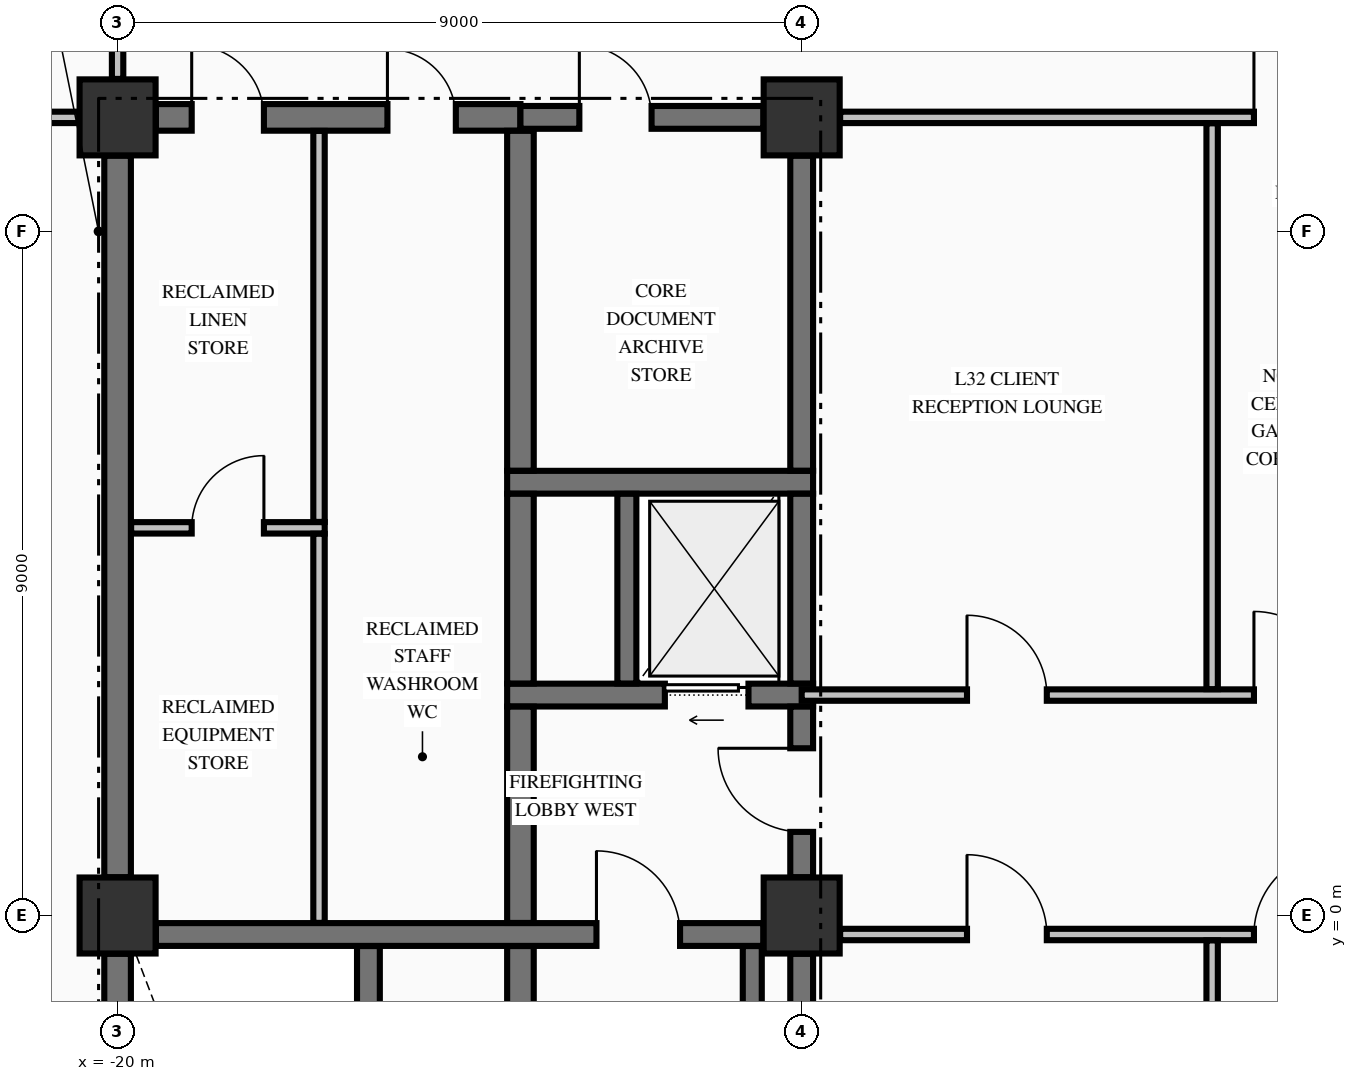
"""IFC4 building model, lengths in metres.
Left out: names, types, materials, properties, quantities, classifications, styles, units other than length and angle.
Written with IfcOpenShell. Run it as: python <this file> out.ifc"""

import sys

from ifc_helpers import new_model, si_unit, direction, frame, frame_2d, origin, origin_2d, place, context, subcontext, project, spatial, rectangle, extrude, element, fill, save


model = new_model("IFC4")
c1 = context("Model", 3, precision=1e-05, world=origin(), true_north=direction((0.0, 1.0)))
c2 = subcontext(c1, "Body", "Model", "MODEL_VIEW")
j1 = project(units=[si_unit("LENGTHUNIT", "METRE"), si_unit("PLANEANGLEUNIT", "RADIAN")], contexts=[c1])
p1 = place(None, origin())
s1 = spatial("IfcSite", under=j1, at=p1, CompositionType="ELEMENT")
p2 = place(p1, origin())
s2 = spatial("IfcBuilding", under=s1, at=p2, CompositionType="ELEMENT")
p3 = place(p2, frame((0.0, 0.0, 128.49)))
s3 = spatial("IfcBuildingStorey", under=s2, at=p3, CompositionType="ELEMENT", Elevation=128.49)
for number, where, z_axis, x_axis in (
    (1, (-20.0, 10.5, -0.25), (0.0, 0.0, 1.0), (1.0, 0.0, 0.0)),
    (2, (-11.0, 0.0, -0.25), (0.0, 0.0, 1.0), (1.0, 0.0, 0.0)),
    (3, (-11.0, 10.5, -0.25), (0.0, 0.0, 1.0), (1.0, 0.0, 0.0)),
    (4, (-20.0, 0.0, -0.25), (0.0, 0.0, 1.0), (1.0, 0.0, 0.0)),
):
    element("IfcColumn", number, at=place(p3, frame(where, z_axis=z_axis, x_axis=x_axis)), inside=s3, PredefinedType="COLUMN", context=c2, shape_type="SweptSolid", body=[
        extrude(rectangle(XDim=1.0, YDim=1.0, at=origin_2d()), origin(), (0.0, 0.0, 1.0), 3.57),
    ])
p4 = place(p3, frame((-19.496, -0.25, 0.0), z_axis=(0.0, 0.0, 1.0), x_axis=(1.0, 0.0, 0.0)))
e5 = element("IfcWall", 5, at=p4, inside=s3, PredefinedType="SHEAR", context=c2, shape_type="SweptSolid", body=[
    extrude(rectangle(XDim=7.992, YDim=0.3, at=frame_2d((3.996, 0.0))), origin(), (0.0, 0.0, 1.0), 3.32),
])
p5 = place(p4, frame((5.796, 0.0, 0.0)))
e6 = element("IfcOpeningElement", 6, at=p5, cuts=e5, PredefinedType="OPENING", context=c2, shape_type="SweptSolid", body=[
    extrude(rectangle(XDim=1.1, YDim=2.15, at=frame_2d((0.55, 1.075))), frame((0.0, 0.16, 0.0), z_axis=(0.0, -1.0, 0.0), x_axis=(1.0, 0.0, 0.0)), (0.0, 0.0, 1.0), 0.32),
])
p6 = place(p3, frame((-14.875, 2.9, 0.0), z_axis=(0.0, 0.0, 1.0), x_axis=(1.0, 0.0, 0.0)))
e7 = element("IfcWall", 7, at=p6, inside=s3, PredefinedType="SHEAR", context=c2, shape_type="SweptSolid", body=[
    extrude(rectangle(XDim=4.025, YDim=0.3, at=frame_2d((2.012, 0.0))), origin(), (0.0, 0.0, 1.0), 3.32),
])
p7 = place(p6, frame((2.075, 0.0, 0.0)))
e8 = element("IfcOpeningElement", 8, at=p7, cuts=e7, PredefinedType="OPENING", context=c2, shape_type="SweptSolid", body=[
    extrude(rectangle(XDim=1.1, YDim=2.2, at=frame_2d((0.55, 1.1))), frame((0.0, 0.16, 0.0), z_axis=(0.0, -1.0, 0.0), x_axis=(1.0, 0.0, 0.0)), (0.0, 0.0, 1.0), 0.32),
])
p8 = place(p3, frame((-14.875, 5.7, 0.0), z_axis=(0.0, 0.0, 1.0), x_axis=(1.0, 0.0, 0.0)))
e9 = element("IfcWall", 9, at=p8, inside=s3, PredefinedType="SHEAR", context=c2, shape_type="SweptSolid", body=[
    extrude(rectangle(XDim=4.025, YDim=0.3, at=frame_2d((2.012, 0.0))), origin(), (0.0, 0.0, 1.0), 3.32),
])
p9 = place(p3, frame((-19.496, 10.5, 0.0), z_axis=(0.0, 0.0, 1.0), x_axis=(1.0, 0.0, 0.0)))
e10 = element("IfcWall", 10, at=p9, inside=s3, PredefinedType="SHEAR", context=c2, shape_type="SweptSolid", body=[
    extrude(rectangle(XDim=4.796, YDim=0.35, at=frame_2d((2.398, 0.0))), origin(), (0.0, 0.0, 1.0), 3.32),
])
p10 = place(p9, frame((0.471, 0.0, 0.0)))
e11 = element("IfcOpeningElement", 11, at=p10, cuts=e10, PredefinedType="OPENING", context=c2, shape_type="SweptSolid", body=[
    extrude(rectangle(XDim=0.95, YDim=2.15, at=frame_2d((0.475, 1.075))), frame((0.0, 0.185, 0.0), z_axis=(0.0, -1.0, 0.0), x_axis=(1.0, 0.0, 0.0)), (0.0, 0.0, 1.0), 0.37),
])
p11 = place(p9, frame((3.046, 0.0, 0.0)))
e12 = element("IfcOpeningElement", 12, at=p11, cuts=e10, PredefinedType="OPENING", context=c2, shape_type="SweptSolid", body=[
    extrude(rectangle(XDim=0.9, YDim=2.15, at=frame_2d((0.45, 1.075))), frame((0.0, 0.185, 0.0), z_axis=(0.0, -1.0, 0.0), x_axis=(1.0, 0.0, 0.0)), (0.0, 0.0, 1.0), 0.37),
])
p12 = place(p3, frame((-14.7, 10.5, 0.0), z_axis=(0.0, 0.0, 1.0), x_axis=(1.0, 0.0, 0.0)))
e13 = element("IfcWall", 13, at=p12, inside=s3, PredefinedType="SHEAR", context=c2, shape_type="SweptSolid", body=[
    extrude(rectangle(XDim=3.196, YDim=0.3, at=frame_2d((1.598, 0.0))), origin(), (0.0, 0.0, 1.0), 3.32),
])
p13 = place(p12, frame((0.775, 0.0, 0.0)))
e14 = element("IfcOpeningElement", 14, at=p13, cuts=e13, PredefinedType="OPENING", context=c2, shape_type="SweptSolid", body=[
    extrude(rectangle(XDim=0.95, YDim=2.15, at=frame_2d((0.475, 1.075))), frame((0.0, 0.16, 0.0), z_axis=(0.0, -1.0, 0.0), x_axis=(1.0, 0.0, 0.0)), (0.0, 0.0, 1.0), 0.32),
])
p14 = place(p3, frame((-10.494, -0.25, 0.0), z_axis=(0.0, 0.0, 1.0), x_axis=(1.0, 0.0, 0.0)))
e15 = element("IfcWall", 15, at=p14, inside=s3, PredefinedType="PARTITIONING", context=c2, shape_type="SweptSolid", body=[
    extrude(rectangle(XDim=20.988, YDim=0.15, at=frame_2d((10.494, 0.0))), origin(), (0.0, 0.0, 1.0), 3.32),
])
p15 = place(p14, frame((5.444, 0.0, 0.0)))
e16 = element("IfcOpeningElement", 16, at=p15, cuts=e15, PredefinedType="OPENING", context=c2, shape_type="SweptSolid", body=[
    extrude(rectangle(XDim=1.1, YDim=2.15, at=frame_2d((0.55, 1.075))), frame((0.0, 0.085, 0.0), z_axis=(0.0, -1.0, 0.0), x_axis=(1.0, 0.0, 0.0)), (0.0, 0.0, 1.0), 0.17),
])
p16 = place(p14, frame((1.669, 0.0, 0.0)))
e17 = element("IfcOpeningElement", 17, at=p16, cuts=e15, PredefinedType="OPENING", context=c2, shape_type="SweptSolid", body=[
    extrude(rectangle(XDim=1.05, YDim=2.15, at=frame_2d((0.525, 1.075))), frame((0.0, 0.085, 0.0), z_axis=(0.0, -1.0, 0.0), x_axis=(1.0, 0.0, 0.0)), (0.0, 0.0, 1.0), 0.17),
])
p17 = place(p14, frame((13.819, 0.0, 0.0)))
e18 = element("IfcOpeningElement", 18, at=p17, cuts=e15, PredefinedType="OPENING", context=c2, shape_type="SweptSolid", body=[
    extrude(rectangle(XDim=0.95, YDim=2.15, at=frame_2d((0.475, 1.075))), frame((0.0, 0.085, 0.0), z_axis=(0.0, -1.0, 0.0), x_axis=(1.0, 0.0, 0.0)), (0.0, 0.0, 1.0), 0.17),
])
p18 = place(p3, frame((-11.0, 2.9, 0.0), z_axis=(0.0, 0.0, 1.0), x_axis=(1.0, 0.0, 0.0)))
e19 = element("IfcWall", 19, at=p18, inside=s3, PredefinedType="PARTITIONING", context=c2, shape_type="SweptSolid", body=[
    extrude(rectangle(XDim=22.0, YDim=0.15, at=frame_2d((11.0, 0.0))), origin(), (0.0, 0.0, 1.0), 3.32),
])
p19 = place(p18, frame((5.95, 0.0, 0.0)))
e20 = element("IfcOpeningElement", 20, at=p19, cuts=e19, PredefinedType="OPENING", context=c2, shape_type="SweptSolid", body=[
    extrude(rectangle(XDim=1.1, YDim=2.15, at=frame_2d((0.55, 1.075))), frame((0.0, 0.085, 0.0), z_axis=(0.0, -1.0, 0.0), x_axis=(1.0, 0.0, 0.0)), (0.0, 0.0, 1.0), 0.17),
])
p20 = place(p18, frame((2.175, 0.0, 0.0)))
e21 = element("IfcOpeningElement", 21, at=p20, cuts=e19, PredefinedType="OPENING", context=c2, shape_type="SweptSolid", body=[
    extrude(rectangle(XDim=1.05, YDim=2.15, at=frame_2d((0.525, 1.075))), frame((0.0, 0.085, 0.0), z_axis=(0.0, -1.0, 0.0), x_axis=(1.0, 0.0, 0.0)), (0.0, 0.0, 1.0), 0.17),
])
p21 = place(p18, frame((14.25, 0.0, 0.0)))
e22 = element("IfcOpeningElement", 22, at=p21, cuts=e19, PredefinedType="OPENING", context=c2, shape_type="SweptSolid", body=[
    extrude(rectangle(XDim=1.1, YDim=2.15, at=frame_2d((0.55, 1.075))), frame((0.0, 0.085, 0.0), z_axis=(0.0, -1.0, 0.0), x_axis=(1.0, 0.0, 0.0)), (0.0, 0.0, 1.0), 0.17),
])
p22 = place(p3, frame((-19.822, 5.1, 0.0), z_axis=(0.0, 0.0, 1.0), x_axis=(1.0, 0.0, 0.0)))
e23 = element("IfcWall", 23, at=p22, inside=s3, PredefinedType="PARTITIONING", context=c2, shape_type="SweptSolid", body=[
    extrude(rectangle(XDim=2.547, YDim=0.15, at=frame_2d((1.273, 0.0))), origin(), (0.0, 0.0, 1.0), 3.32),
])
p23 = place(p22, frame((0.797, 0.0, 0.0)))
e24 = element("IfcOpeningElement", 24, at=p23, cuts=e23, PredefinedType="OPENING", context=c2, shape_type="SweptSolid", body=[
    extrude(rectangle(XDim=0.95, YDim=2.15, at=frame_2d((0.475, 1.075))), frame((0.0, 0.085, 0.0), z_axis=(0.0, -1.0, 0.0), x_axis=(1.0, 0.0, 0.0)), (0.0, 0.0, 1.0), 0.17),
])
p24 = place(p3, frame((-27.835, 10.5, 0.0), z_axis=(0.0, 0.0, 1.0), x_axis=(1.0, 0.0, 0.0)))
e25 = element("IfcWall", 25, at=p24, inside=s3, PredefinedType="PARTITIONING", context=c2, shape_type="SweptSolid", body=[
    extrude(rectangle(XDim=7.329, YDim=0.15, at=frame_2d((3.665, 0.0))), origin(), (0.0, 0.0, 1.0), 3.32),
])
p25 = place(p24, frame((3.36, 0.0, 0.0)))
e26 = element("IfcOpeningElement", 26, at=p25, cuts=e25, PredefinedType="OPENING", context=c2, shape_type="SweptSolid", body=[
    extrude(rectangle(XDim=0.95, YDim=2.15, at=frame_2d((0.475, 1.075))), frame((0.0, 0.085, 0.0), z_axis=(0.0, -1.0, 0.0), x_axis=(1.0, 0.0, 0.0)), (0.0, 0.0, 1.0), 0.17),
])
p26 = place(p3, frame((-10.494, 10.5, 0.0), z_axis=(0.0, 0.0, 1.0), x_axis=(1.0, 0.0, 0.0)))
e27 = element("IfcWall", 27, at=p26, inside=s3, PredefinedType="PARTITIONING", context=c2, shape_type="SweptSolid", body=[
    extrude(rectangle(XDim=20.988, YDim=0.15, at=frame_2d((10.494, 0.0))), origin(), (0.0, 0.0, 1.0), 3.32),
])
p27 = place(p26, frame((5.444, 0.0, 0.0)))
e28 = element("IfcOpeningElement", 28, at=p27, cuts=e27, PredefinedType="OPENING", context=c2, shape_type="SweptSolid", body=[
    extrude(rectangle(XDim=1.1, YDim=2.15, at=frame_2d((0.55, 1.075))), frame((0.0, 0.085, 0.0), z_axis=(0.0, -1.0, 0.0), x_axis=(1.0, 0.0, 0.0)), (0.0, 0.0, 1.0), 0.17),
])
p28 = place(p3, frame((-20.0, -9.446, 0.0), z_axis=(0.0, 0.0, 1.0), x_axis=(0.0, 1.0, 0.0)))
e29 = element("IfcWall", 29, at=p28, inside=s3, PredefinedType="SHEAR", context=c2, shape_type="SweptSolid", body=[
    extrude(rectangle(XDim=8.942, YDim=0.35, at=frame_2d((4.471, 0.0))), origin(), (0.0, 0.0, 1.0), 3.32),
])
p29 = place(p3, frame((-20.0, 0.504, 0.0), z_axis=(0.0, 0.0, 1.0), x_axis=(0.0, 1.0, 0.0)))
e30 = element("IfcWall", 30, at=p29, inside=s3, PredefinedType="SHEAR", context=c2, shape_type="SweptSolid", body=[
    extrude(rectangle(XDim=9.492, YDim=0.35, at=frame_2d((4.746, 0.0))), origin(), (0.0, 0.0, 1.0), 3.32),
])
p30 = place(p3, frame((-16.7, -9.773, 0.0), z_axis=(0.0, 0.0, 1.0), x_axis=(0.0, 1.0, 0.0)))
e31 = element("IfcWall", 31, at=p30, inside=s3, PredefinedType="SHEAR", context=c2, shape_type="SweptSolid", body=[
    extrude(rectangle(XDim=9.371, YDim=0.3, at=frame_2d((4.686, 0.0))), origin(), (0.0, 0.0, 1.0), 3.32),
])
p31 = place(p3, frame((-14.7, -9.773, 0.0), z_axis=(0.0, 0.0, 1.0), x_axis=(0.0, 1.0, 0.0)))
e32 = element("IfcWall", 32, at=p31, inside=s3, PredefinedType="SHEAR", context=c2, shape_type="SweptSolid", body=[
    extrude(rectangle(XDim=9.371, YDim=0.35, at=frame_2d((4.686, 0.0))), origin(), (0.0, 0.0, 1.0), 3.32),
])
p32 = place(p3, frame((-14.7, -0.098, 0.0), z_axis=(0.0, 0.0, 1.0), x_axis=(0.0, 1.0, 0.0)))
e33 = element("IfcWall", 33, at=p32, inside=s3, PredefinedType="SHEAR", context=c2, shape_type="SweptSolid", body=[
    extrude(rectangle(XDim=2.846, YDim=0.35, at=frame_2d((1.423, 0.0))), origin(), (0.0, 0.0, 1.0), 3.32),
])
p33 = place(p3, frame((-14.7, 3.052, 0.0), z_axis=(0.0, 0.0, 1.0), x_axis=(0.0, 1.0, 0.0)))
e34 = element("IfcWall", 34, at=p33, inside=s3, PredefinedType="SHEAR", context=c2, shape_type="SweptSolid", body=[
    extrude(rectangle(XDim=2.496, YDim=0.35, at=frame_2d((1.248, 0.0))), origin(), (0.0, 0.0, 1.0), 3.32),
])
p34 = place(p3, frame((-14.7, 5.852, 0.0), z_axis=(0.0, 0.0, 1.0), x_axis=(0.0, 1.0, 0.0)))
e35 = element("IfcWall", 35, at=p34, inside=s3, PredefinedType="SHEAR", context=c2, shape_type="SweptSolid", body=[
    extrude(rectangle(XDim=4.471, YDim=0.35, at=frame_2d((2.235, 0.0))), origin(), (0.0, 0.0, 1.0), 3.32),
])
p35 = place(p3, frame((-13.3, 3.052, 0.0), z_axis=(0.0, 0.0, 1.0), x_axis=(0.0, 1.0, 0.0)))
e36 = element("IfcWall", 36, at=p35, inside=s3, PredefinedType="SOLIDWALL", context=c2, shape_type="SweptSolid", body=[
    extrude(rectangle(XDim=2.496, YDim=0.25, at=frame_2d((1.248, 0.0))), origin(), (0.0, 0.0, 1.0), 3.32),
])
p36 = place(p3, frame((-11.65, -9.798, 0.0), z_axis=(0.0, 0.0, 1.0), x_axis=(0.0, 1.0, 0.0)))
e37 = element("IfcWall", 37, at=p36, inside=s3, PredefinedType="SOLIDWALL", context=c2, shape_type="SweptSolid", body=[
    extrude(rectangle(XDim=9.396, YDim=0.25, at=frame_2d((4.698, 0.0))), origin(), (0.0, 0.0, 1.0), 3.32),
])
p37 = place(p3, frame((-11.0, -9.446, 0.0), z_axis=(0.0, 0.0, 1.0), x_axis=(0.0, 1.0, 0.0)))
e38 = element("IfcWall", 38, at=p37, inside=s3, PredefinedType="SHEAR", context=c2, shape_type="SweptSolid", body=[
    extrude(rectangle(XDim=8.942, YDim=0.3, at=frame_2d((4.471, 0.0))), origin(), (0.0, 0.0, 1.0), 3.32),
])
p38 = place(p3, frame((-11.0, 0.504, 0.0), z_axis=(0.0, 0.0, 1.0), x_axis=(0.0, 1.0, 0.0)))
e39 = element("IfcWall", 39, at=p38, inside=s3, PredefinedType="SHEAR", context=c2, shape_type="SweptSolid", body=[
    extrude(rectangle(XDim=2.244, YDim=0.3, at=frame_2d((1.122, 0.0))), origin(), (0.0, 0.0, 1.0), 3.32),
])
p39 = place(p38, frame((0.596, 0.0, 0.0)))
e40 = element("IfcOpeningElement", 40, at=p39, cuts=e39, PredefinedType="OPENING", context=c2, shape_type="SweptSolid", body=[
    extrude(rectangle(XDim=1.1, YDim=2.15, at=frame_2d((0.55, 1.075))), frame((0.0, 0.16, 0.0), z_axis=(0.0, -1.0, 0.0), x_axis=(1.0, 0.0, 0.0)), (0.0, 0.0, 1.0), 0.32),
])
p40 = place(p3, frame((-11.0, 3.052, 0.0), z_axis=(0.0, 0.0, 1.0), x_axis=(0.0, 1.0, 0.0)))
e41 = element("IfcWall", 41, at=p40, inside=s3, PredefinedType="SHEAR", context=c2, shape_type="SweptSolid", body=[
    extrude(rectangle(XDim=2.496, YDim=0.3, at=frame_2d((1.248, 0.0))), origin(), (0.0, 0.0, 1.0), 3.32),
])
p41 = place(p3, frame((-11.0, 5.852, 0.0), z_axis=(0.0, 0.0, 1.0), x_axis=(0.0, 1.0, 0.0)))
e42 = element("IfcWall", 42, at=p41, inside=s3, PredefinedType="SHEAR", context=c2, shape_type="SweptSolid", body=[
    extrude(rectangle(XDim=4.144, YDim=0.3, at=frame_2d((2.072, 0.0))), origin(), (0.0, 0.0, 1.0), 3.32),
])
p42 = place(p3, frame((-20.0, 11.006, 0.0), z_axis=(0.0, 0.0, 1.0), x_axis=(0.0, 1.0, 0.0)))
e43 = element("IfcWall", 43, at=p42, inside=s3, PredefinedType="PARTITIONING", context=c2, shape_type="SweptSolid", body=[
    extrude(rectangle(XDim=2.466, YDim=0.15, at=frame_2d((1.233, 0.0))), origin(), (0.0, 0.0, 1.0), 2.81),
])
p43 = place(p42, frame((0.549, 0.0, 0.0)))
e44 = element("IfcOpeningElement", 44, at=p43, cuts=e43, PredefinedType="OPENING", context=c2, shape_type="SweptSolid", body=[
    extrude(rectangle(XDim=0.95, YDim=2.15, at=frame_2d((0.475, 1.075))), frame((0.0, 0.085, 0.0), z_axis=(0.0, -1.0, 0.0), x_axis=(1.0, 0.0, 0.0)), (0.0, 0.0, 1.0), 0.17),
])
p44 = place(p3, frame((-17.35, -0.097, 0.0), z_axis=(0.0, 0.0, 1.0), x_axis=(0.0, 1.0, 0.0)))
e45 = element("IfcWall", 45, at=p44, inside=s3, PredefinedType="PARTITIONING", context=c2, shape_type="SweptSolid", body=[
    extrude(rectangle(XDim=5.119, YDim=0.15, at=frame_2d((2.56, 0.0))), origin(), (0.0, 0.0, 1.0), 3.32),
])
p45 = place(p3, frame((-17.35, 5.178, 0.0), z_axis=(0.0, 0.0, 1.0), x_axis=(0.0, 1.0, 0.0)))
e46 = element("IfcWall", 46, at=p45, inside=s3, PredefinedType="PARTITIONING", context=c2, shape_type="SweptSolid", body=[
    extrude(rectangle(XDim=5.144, YDim=0.15, at=frame_2d((2.572, 0.0))), origin(), (0.0, 0.0, 1.0), 3.32),
])
p46 = place(p3, frame((-5.6, -9.872, 0.0), z_axis=(0.0, 0.0, 1.0), x_axis=(0.0, 1.0, 0.0)))
e47 = element("IfcWall", 47, at=p46, inside=s3, PredefinedType="PARTITIONING", context=c2, shape_type="SweptSolid", body=[
    extrude(rectangle(XDim=9.544, YDim=0.15, at=frame_2d((4.772, 0.0))), origin(), (0.0, 0.0, 1.0), 3.32),
])
p47 = place(p3, frame((-5.6, 2.978, 0.0), z_axis=(0.0, 0.0, 1.0), x_axis=(0.0, 1.0, 0.0)))
e48 = element("IfcWall", 48, at=p47, inside=s3, PredefinedType="PARTITIONING", context=c2, shape_type="SweptSolid", body=[
    extrude(rectangle(XDim=7.444, YDim=0.15, at=frame_2d((3.722, 0.0))), origin(), (0.0, 0.0, 1.0), 3.32),
])
p48 = place(p5, origin())
e49 = element("IfcDoor", 49, at=p48, inside=s3, OperationType="SINGLE_SWING_LEFT", PredefinedType="DOOR", context=c2, shape_type="SweptSolid", body=[
    extrude(rectangle(XDim=1.1, YDim=2.15, at=frame_2d((0.55, 1.075))), frame((0.0, 0.025, 0.0), z_axis=(0.0, -1.0, 0.0), x_axis=(1.0, 0.0, 0.0)), (0.0, 0.0, 1.0), 0.05),
])
fill(e6, e49)
p49 = place(p39, origin())
e50 = element("IfcDoor", 50, at=p49, inside=s3, OperationType="SINGLE_SWING_RIGHT", PredefinedType="DOOR", context=c2, shape_type="SweptSolid", body=[
    extrude(rectangle(XDim=1.1, YDim=2.15, at=frame_2d((0.55, 1.075))), frame((0.0, 0.025, 0.0), z_axis=(0.0, -1.0, 0.0), x_axis=(1.0, 0.0, 0.0)), (0.0, 0.0, 1.0), 0.05),
])
fill(e40, e50)
p50 = place(p7, origin())
e51 = element("IfcDoor", 51, at=p50, inside=s3, OperationType="SLIDING_TO_LEFT", PredefinedType="DOOR", context=c2, shape_type="SweptSolid", body=[
    extrude(rectangle(XDim=1.1, YDim=2.2, at=frame_2d((0.55, 1.1))), frame((0.0, 0.025, 0.0), z_axis=(0.0, -1.0, 0.0), x_axis=(1.0, 0.0, 0.0)), (0.0, 0.0, 1.0), 0.05),
])
fill(e8, e51)
p51 = place(p13, origin())
e52 = element("IfcDoor", 52, at=p51, inside=s3, OperationType="SINGLE_SWING_LEFT", PredefinedType="DOOR", context=c2, shape_type="SweptSolid", body=[
    extrude(rectangle(XDim=0.95, YDim=2.15, at=frame_2d((0.475, 1.075))), frame((0.0, 0.025, 0.0), z_axis=(0.0, -1.0, 0.0), x_axis=(1.0, 0.0, 0.0)), (0.0, 0.0, 1.0), 0.05),
])
fill(e14, e52)
p52 = place(p10, origin())
e53 = element("IfcDoor", 53, at=p52, inside=s3, OperationType="SINGLE_SWING_LEFT", PredefinedType="DOOR", context=c2, shape_type="SweptSolid", body=[
    extrude(rectangle(XDim=0.95, YDim=2.15, at=frame_2d((0.475, 1.075))), frame((0.0, 0.025, 0.0), z_axis=(0.0, -1.0, 0.0), x_axis=(1.0, 0.0, 0.0)), (0.0, 0.0, 1.0), 0.05),
])
fill(e11, e53)
p53 = place(p23, origin())
e54 = element("IfcDoor", 54, at=p53, inside=s3, OperationType="SINGLE_SWING_RIGHT", PredefinedType="DOOR", context=c2, shape_type="SweptSolid", body=[
    extrude(rectangle(XDim=0.95, YDim=2.15, at=frame_2d((0.475, 1.075))), frame((0.0, 0.025, 0.0), z_axis=(0.0, -1.0, 0.0), x_axis=(1.0, 0.0, 0.0)), (0.0, 0.0, 1.0), 0.05),
])
fill(e24, e54)
p54 = place(p11, origin())
e55 = element("IfcDoor", 55, at=p54, inside=s3, OperationType="SINGLE_SWING_LEFT", PredefinedType="DOOR", context=c2, shape_type="SweptSolid", body=[
    extrude(rectangle(XDim=0.9, YDim=2.15, at=frame_2d((0.45, 1.075))), frame((0.0, 0.025, 0.0), z_axis=(0.0, -1.0, 0.0), x_axis=(1.0, 0.0, 0.0)), (0.0, 0.0, 1.0), 0.05),
])
fill(e12, e55)
p55 = place(p27, origin())
e56 = element("IfcDoor", 56, at=p55, inside=s3, OperationType="SINGLE_SWING_LEFT", PredefinedType="DOOR", context=c2, shape_type="SweptSolid", body=[
    extrude(rectangle(XDim=1.1, YDim=2.15, at=frame_2d((0.55, 1.075))), frame((0.0, 0.025, 0.0), z_axis=(0.0, -1.0, 0.0), x_axis=(1.0, 0.0, 0.0)), (0.0, 0.0, 1.0), 0.05),
])
fill(e28, e56)
p56 = place(p19, origin())
e57 = element("IfcDoor", 57, at=p56, inside=s3, OperationType="SINGLE_SWING_LEFT", PredefinedType="DOOR", context=c2, shape_type="SweptSolid", body=[
    extrude(rectangle(XDim=1.1, YDim=2.15, at=frame_2d((0.55, 1.075))), frame((0.0, 0.025, 0.0), z_axis=(0.0, -1.0, 0.0), x_axis=(1.0, 0.0, 0.0)), (0.0, 0.0, 1.0), 0.05),
])
fill(e20, e57)
p57 = place(p15, origin())
e58 = element("IfcDoor", 58, at=p57, inside=s3, OperationType="SINGLE_SWING_RIGHT", PredefinedType="DOOR", context=c2, shape_type="SweptSolid", body=[
    extrude(rectangle(XDim=1.1, YDim=2.15, at=frame_2d((0.55, 1.075))), frame((0.0, 0.025, 0.0), z_axis=(0.0, -1.0, 0.0), x_axis=(1.0, 0.0, 0.0)), (0.0, 0.0, 1.0), 0.05),
])
fill(e16, e58)
p58 = place(p20, origin())
e59 = element("IfcDoor", 59, at=p58, inside=s3, OperationType="SINGLE_SWING_LEFT", PredefinedType="DOOR", context=c2, shape_type="SweptSolid", body=[
    extrude(rectangle(XDim=1.05, YDim=2.15, at=frame_2d((0.525, 1.075))), frame((0.0, 0.025, 0.0), z_axis=(0.0, -1.0, 0.0), x_axis=(1.0, 0.0, 0.0)), (0.0, 0.0, 1.0), 0.05),
])
fill(e21, e59)
p59 = place(p16, origin())
e60 = element("IfcDoor", 60, at=p59, inside=s3, OperationType="SINGLE_SWING_LEFT", PredefinedType="DOOR", context=c2, shape_type="SweptSolid", body=[
    extrude(rectangle(XDim=1.05, YDim=2.15, at=frame_2d((0.525, 1.075))), frame((0.0, 0.025, 0.0), z_axis=(0.0, -1.0, 0.0), x_axis=(1.0, 0.0, 0.0)), (0.0, 0.0, 1.0), 0.05),
])
fill(e17, e60)
save(model, sys.argv[1])
